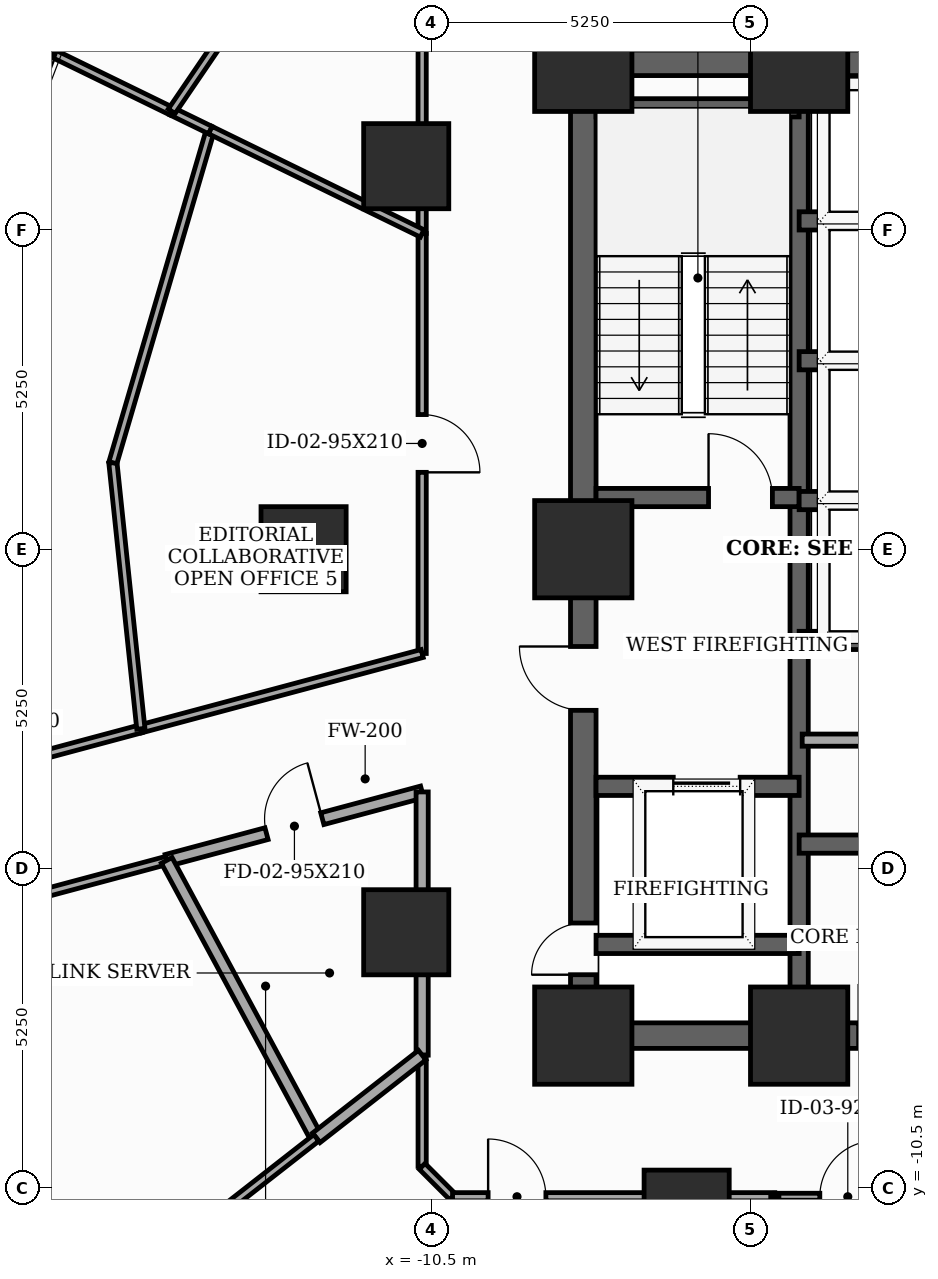
"""IFC4 building model, lengths in metres.
Left out: names, types, materials, properties, quantities, classifications, styles, units other than length and angle.
Written with IfcOpenShell. Run it as: python <this file> out.ifc"""

import sys

from ifc_helpers import new_model, si_unit, direction, frame, frame_2d, origin, origin_2d, place, context, subcontext, project, spatial, rectangle, extrude, element, fill, save


model = new_model("IFC4")
c1 = context("Model", 3, precision=1e-05, world=origin(), true_north=direction((0.0, 1.0)))
c2 = subcontext(c1, "Body", "Model", "MODEL_VIEW")
j1 = project(units=[si_unit("LENGTHUNIT", "METRE"), si_unit("PLANEANGLEUNIT", "RADIAN")], contexts=[c1])
p1 = place(None, origin())
s1 = spatial("IfcSite", under=j1, at=p1, CompositionType="ELEMENT")
p2 = place(p1, origin())
s2 = spatial("IfcBuilding", under=s1, at=p2, CompositionType="ELEMENT")
p3 = place(p2, frame((0.0, 0.0, 77.8)))
s3 = spatial("IfcBuildingStorey", under=s2, at=p3, CompositionType="ELEMENT", Elevation=77.8)
for number, where, z_axis, x_axis in (
    (1, (-8.0, -8.0, 0.0), (0.0, 0.0, 1.0), (1.0, 0.0, 0.0)),
    (2, (-4.45, -8.0, 0.0), (0.0, 0.0, 1.0), (1.0, 0.0, 0.0)),
    (3, (-4.45, 8.0, 0.0), (0.0, 0.0, 1.0), (1.0, 0.0, 0.0)),
    (4, (-8.0, 8.0, 0.0), (0.0, 0.0, 1.0), (1.0, 0.0, 0.0)),
    (5, (-8.0, 0.0, 0.0), (0.0, 0.0, 1.0), (1.0, 0.0, 0.0)),
):
    element("IfcColumn", number, at=place(p3, frame(where, z_axis=z_axis, x_axis=x_axis)), inside=s3, PredefinedType="COLUMN", context=c2, shape_type="SweptSolid", body=[
        extrude(rectangle(XDim=1.6, YDim=1.6, at=origin_2d()), origin(), (0.0, 0.0, 1.0), 3.7),
    ])
for number, where, z_axis, x_axis in (
    (6, (-10.912, 6.3, 0.0), (0.0, 0.0, 1.0), (1.0, 0.0, 0.0)),
    (7, (-12.6, 0.0, 0.0), (0.0, 0.0, 1.0), (1.0, 0.0, 0.0)),
    (8, (-10.912, -6.3, 0.0), (0.0, 0.0, 1.0), (1.0, 0.0, 0.0)),
    (9, (-6.3, -10.912, 0.0), (0.0, 0.0, 1.0), (1.0, 0.0, 0.0)),
):
    element("IfcColumn", number, at=place(p3, frame(where, z_axis=z_axis, x_axis=x_axis)), inside=s3, PredefinedType="COLUMN", context=c2, shape_type="SweptSolid", body=[
        extrude(rectangle(XDim=1.4, YDim=1.4, at=origin_2d()), origin(), (0.0, 0.0, 1.0), 3.7),
    ])
p4 = place(p3, frame((-8.0, -8.0, 0.0), z_axis=(0.0, 0.0, 1.0), x_axis=(0.0, 1.0, 0.0)))
e10 = element("IfcWall", 10, at=p4, inside=s3, PredefinedType="SHEAR", context=c2, shape_type="SweptSolid", body=[
    extrude(rectangle(XDim=16.0, YDim=0.42, at=frame_2d((8.0, 0.0))), origin(), (0.0, 0.0, 1.0), 3.5),
])
p5 = place(p4, frame((1.002, 0.0, 0.0)))
e11 = element("IfcOpeningElement", 11, at=p5, cuts=e10, PredefinedType="OPENING", context=c2, shape_type="SweptSolid", body=[
    extrude(rectangle(XDim=0.85, YDim=2.02, at=frame_2d((0.425, 1.01))), frame((0.0, 0.22, 0.0), z_axis=(0.0, -1.0, 0.0), x_axis=(1.0, 0.0, 0.0)), (0.0, 0.0, 1.0), 0.44),
])
p6 = place(p4, frame((5.35, 0.0, 0.0)))
e12 = element("IfcOpeningElement", 12, at=p6, cuts=e10, PredefinedType="OPENING", context=c2, shape_type="SweptSolid", body=[
    extrude(rectangle(XDim=1.05, YDim=2.15, at=frame_2d((0.525, 1.075))), frame((0.0, 0.22, 0.0), z_axis=(0.0, -1.0, 0.0), x_axis=(1.0, 0.0, 0.0)), (0.0, 0.0, 1.0), 0.44),
])
p7 = place(p3, frame((-8.0, -8.0, 0.0), z_axis=(0.0, 0.0, 1.0), x_axis=(1.0, 0.0, 0.0)))
e13 = element("IfcWall", 13, at=p7, inside=s3, PredefinedType="SHEAR", context=c2, shape_type="SweptSolid", body=[
    extrude(rectangle(XDim=16.0, YDim=0.42, at=frame_2d((8.0, 0.0))), origin(), (0.0, 0.0, 1.0), 3.5),
])
p8 = place(p7, frame((4.529, 0.0, 0.0)))
e14 = element("IfcOpeningElement", 14, at=p8, cuts=e13, PredefinedType="OPENING", context=c2, shape_type="SweptSolid", body=[
    extrude(rectangle(XDim=0.85, YDim=2.02, at=frame_2d((0.425, 1.01))), frame((0.0, 0.22, 0.0), z_axis=(0.0, -1.0, 0.0), x_axis=(1.0, 0.0, 0.0)), (0.0, 0.0, 1.0), 0.44),
])
p9 = place(p7, frame((6.49, 0.0, 0.0)))
e15 = element("IfcOpeningElement", 15, at=p9, cuts=e13, PredefinedType="OPENING", context=c2, shape_type="SweptSolid", body=[
    extrude(rectangle(XDim=0.85, YDim=2.02, at=frame_2d((0.425, 1.01))), frame((0.0, 0.22, 0.0), z_axis=(0.0, -1.0, 0.0), x_axis=(1.0, 0.0, 0.0)), (0.0, 0.0, 1.0), 0.44),
])
p10 = place(p7, frame((8.69, 0.0, 0.0)))
e16 = element("IfcOpeningElement", 16, at=p10, cuts=e13, PredefinedType="OPENING", context=c2, shape_type="SweptSolid", body=[
    extrude(rectangle(XDim=0.85, YDim=2.02, at=frame_2d((0.425, 1.01))), frame((0.0, 0.22, 0.0), z_axis=(0.0, -1.0, 0.0), x_axis=(1.0, 0.0, 0.0)), (0.0, 0.0, 1.0), 0.44),
])
p11 = place(p7, frame((10.621, 0.0, 0.0)))
e17 = element("IfcOpeningElement", 17, at=p11, cuts=e13, PredefinedType="OPENING", context=c2, shape_type="SweptSolid", body=[
    extrude(rectangle(XDim=0.85, YDim=2.02, at=frame_2d((0.425, 1.01))), frame((0.0, 0.22, 0.0), z_axis=(0.0, -1.0, 0.0), x_axis=(1.0, 0.0, 0.0)), (0.0, 0.0, 1.0), 0.44),
])
p12 = place(p3, frame((-8.0, 8.0, 0.0), z_axis=(0.0, 0.0, 1.0), x_axis=(1.0, 0.0, 0.0)))
e18 = element("IfcWall", 18, at=p12, inside=s3, PredefinedType="SHEAR", context=c2, shape_type="SweptSolid", body=[
    extrude(rectangle(XDim=16.0, YDim=0.42, at=frame_2d((8.0, 0.0))), origin(), (0.0, 0.0, 1.0), 3.5),
])
p13 = place(p12, frame((7.1, 0.0, 0.0)))
e19 = element("IfcOpeningElement", 19, at=p13, cuts=e18, PredefinedType="OPENING", context=c2, shape_type="SweptSolid", body=[
    extrude(rectangle(XDim=1.8, YDim=2.15, at=frame_2d((0.9, 1.075))), frame((0.0, 0.22, 0.0), z_axis=(0.0, -1.0, 0.0), x_axis=(1.0, 0.0, 0.0)), (0.0, 0.0, 1.0), 0.44),
])
p14 = place(p3, frame((-4.45, -7.79, 0.0), z_axis=(0.0, 0.0, 1.0), x_axis=(0.0, 1.0, 0.0)))
e20 = element("IfcWall", 20, at=p14, inside=s3, PredefinedType="SHEAR", context=c2, shape_type="SweptSolid", body=[
    extrude(rectangle(XDim=15.58, YDim=0.3, at=frame_2d((7.79, 0.0))), origin(), (0.0, 0.0, 1.0), 3.5),
])
p15 = place(p3, frame((-7.79, 0.85, 0.0), z_axis=(0.0, 0.0, 1.0), x_axis=(1.0, 0.0, 0.0)))
e21 = element("IfcWall", 21, at=p15, inside=s3, PredefinedType="SHEAR", context=c2, shape_type="SweptSolid", body=[
    extrude(rectangle(XDim=3.34, YDim=0.3, at=frame_2d((1.67, 0.0))), origin(), (0.0, 0.0, 1.0), 3.5),
])
p16 = place(p15, frame((1.85, 0.0, 0.0)))
e22 = element("IfcOpeningElement", 22, at=p16, cuts=e21, PredefinedType="OPENING", context=c2, shape_type="SweptSolid", body=[
    extrude(rectangle(XDim=1.05, YDim=2.15, at=frame_2d((0.525, 1.075))), frame((0.0, 0.16, 0.0), z_axis=(0.0, -1.0, 0.0), x_axis=(1.0, 0.0, 0.0)), (0.0, 0.0, 1.0), 0.32),
])
p17 = place(p3, frame((-7.79, 7.26, 0.0), z_axis=(0.0, 0.0, 1.0), x_axis=(1.0, 0.0, 0.0)))
e23 = element("IfcWall", 23, at=p17, inside=s3, PredefinedType="SHEAR", context=c2, shape_type="SweptSolid", body=[
    extrude(rectangle(XDim=3.34, YDim=0.3, at=frame_2d((1.67, 0.0))), origin(), (0.0, 0.0, 1.0), 3.5),
])
p18 = place(p3, frame((-7.79, -3.9, 0.0), z_axis=(0.0, 0.0, 1.0), x_axis=(1.0, 0.0, 0.0)))
e24 = element("IfcWall", 24, at=p18, inside=s3, PredefinedType="SHEAR", context=c2, shape_type="SweptSolid", body=[
    extrude(rectangle(XDim=3.34, YDim=0.3, at=frame_2d((1.67, 0.0))), origin(), (0.0, 0.0, 1.0), 3.5),
])
p19 = place(p18, frame((1.27, 0.0, 0.0)))
e25 = element("IfcOpeningElement", 25, at=p19, cuts=e24, PredefinedType="OPENING", context=c2, shape_type="SweptSolid", body=[
    extrude(rectangle(XDim=1.1, YDim=2.1, at=frame_2d((0.55, 1.05))), frame((0.0, 0.16, 0.0), z_axis=(0.0, -1.0, 0.0), x_axis=(1.0, 0.0, 0.0)), (0.0, 0.0, 1.0), 0.32),
])
p20 = place(p3, frame((-7.79, -6.5, 0.0), z_axis=(0.0, 0.0, 1.0), x_axis=(1.0, 0.0, 0.0)))
e26 = element("IfcWall", 26, at=p20, inside=s3, PredefinedType="SHEAR", context=c2, shape_type="SweptSolid", body=[
    extrude(rectangle(XDim=3.34, YDim=0.3, at=frame_2d((1.67, 0.0))), origin(), (0.0, 0.0, 1.0), 3.5),
])
p21 = place(p3, frame((-4.45, -4.85, 0.0), z_axis=(0.0, 0.0, 1.0), x_axis=(1.0, 0.0, 0.0)))
e27 = element("IfcWall", 27, at=p21, inside=s3, PredefinedType="SHEAR", context=c2, shape_type="SweptSolid", body=[
    extrude(rectangle(XDim=8.9, YDim=0.3, at=frame_2d((4.45, 0.0))), origin(), (0.0, 0.0, 1.0), 3.5),
])
for number, where, z_axis, x_axis in (
    (28, (-4.45, -1.5, 0.0), (0.0, 0.0, 1.0), (1.0, 0.0, 0.0)),
    (29, (-4.45, 0.8, 0.0), (0.0, 0.0, 1.0), (1.0, 0.0, 0.0)),
    (30, (-4.45, 3.1, 0.0), (0.0, 0.0, 1.0), (1.0, 0.0, 0.0)),
    (31, (-4.45, 5.4, 0.0), (0.0, 0.0, 1.0), (1.0, 0.0, 0.0)),
):
    element("IfcWall", number, at=place(p3, frame(where, z_axis=z_axis, x_axis=x_axis)), inside=s3, PredefinedType="SHEAR", context=c2, shape_type="SweptSolid", body=[
        extrude(rectangle(XDim=2.77, YDim=0.3, at=frame_2d((1.385, 0.0))), origin(), (0.0, 0.0, 1.0), 3.5),
    ])
p22 = place(p3, frame((-4.4, -3.14, 0.0), z_axis=(0.0, 0.0, 1.0), x_axis=(1.0, 0.0, 0.0)))
e32 = element("IfcWall", 32, at=p22, inside=s3, PredefinedType="SOLIDWALL", context=c2, shape_type="SweptSolid", body=[
    extrude(rectangle(XDim=2.68, YDim=0.2, at=frame_2d((1.34, 0.0))), origin(), (0.0, 0.0, 1.0), 3.5),
])
p23 = place(p3, frame((-14.851, -5.118, 0.0), z_axis=(0.0, 0.0, 1.0), x_axis=(0.965909963178, 0.258878239783, 0.0)))
e33 = element("IfcWall", 33, at=p23, inside=s3, PredefinedType="SOLIDWALL", context=c2, shape_type="SweptSolid", body=[
    extrude(rectangle(XDim=4.349, YDim=0.2, at=frame_2d((2.175, 0.0))), origin(), (0.0, 0.0, 1.0), 2.785),
])
p24 = place(p23, frame((1.7, 0.0, 0.0)))
e34 = element("IfcOpeningElement", 34, at=p24, cuts=e33, PredefinedType="OPENING", context=c2, shape_type="SweptSolid", body=[
    extrude(rectangle(XDim=0.95, YDim=2.1, at=frame_2d((0.475, 1.05))), frame((0.0, 0.11, 0.0), z_axis=(0.0, -1.0, 0.0), x_axis=(1.0, 0.0, 0.0)), (0.0, 0.0, 1.0), 0.22),
])
p25 = place(p3, frame((-10.65, -3.992, 0.0), z_axis=(0.0, 0.0, 1.0), x_axis=(0.0, -1.0, 0.0)))
e35 = element("IfcWall", 35, at=p25, inside=s3, PredefinedType="SOLIDWALL", context=c2, shape_type="SweptSolid", body=[
    extrude(rectangle(XDim=4.329, YDim=0.2, at=frame_2d((2.165, 0.0))), origin(), (0.0, 0.0, 1.0), 2.785),
])
p26 = place(p3, frame((-15.276, -2.954, 0.0), z_axis=(0.0, 0.0, 1.0), x_axis=(-0.965923168362, -0.258828964418, 0.0)))
e36 = element("IfcWall", 36, at=p26, inside=s3, PredefinedType="PARTITIONING", context=c2, shape_type="SweptSolid", body=[
    extrude(rectangle(XDim=5.08, YDim=0.135, at=frame_2d((2.54, 0.0))), origin(), (0.0, 0.0, 1.0), 2.935),
])
p27 = place(p26, frame((2.065, 0.0, 0.0)))
e37 = element("IfcOpeningElement", 37, at=p27, cuts=e36, PredefinedType="OPENING", context=c2, shape_type="SweptSolid", body=[
    extrude(rectangle(XDim=0.95, YDim=2.1, at=frame_2d((0.475, 1.05))), frame((0.0, 0.077, 0.0), z_axis=(0.0, -1.0, 0.0), x_axis=(1.0, 0.0, 0.0)), (0.0, 0.0, 1.0), 0.155),
])
p28 = place(p3, frame((-19.613, -6.394, 0.0), z_axis=(0.0, 0.0, 1.0), x_axis=(0.965917766169, 0.258849124007, 0.0)))
e38 = element("IfcWall", 38, at=p28, inside=s3, PredefinedType="PARTITIONING", context=c2, shape_type="SweptSolid", body=[
    extrude(rectangle(XDim=4.93, YDim=0.135, at=frame_2d((2.465, 0.0))), origin(), (0.0, 0.0, 1.0), 3.085),
])
p29 = place(p3, frame((-10.65, 5.194, 0.0), z_axis=(0.0, 0.0, 1.0), x_axis=(0.0, -1.0, 0.0)))
e39 = element("IfcWall", 39, at=p29, inside=s3, PredefinedType="PARTITIONING", context=c2, shape_type="SweptSolid", body=[
    extrude(rectangle(XDim=6.909, YDim=0.135, at=frame_2d((3.455, 0.0))), origin(), (0.0, 0.0, 1.0), 2.785),
])
p30 = place(p29, frame((2.979, 0.0, 0.0)))
e40 = element("IfcOpeningElement", 40, at=p30, cuts=e39, PredefinedType="OPENING", context=c2, shape_type="SweptSolid", body=[
    extrude(rectangle(XDim=0.95, YDim=2.1, at=frame_2d((0.475, 1.05))), frame((0.0, 0.077, 0.0), z_axis=(0.0, -1.0, 0.0), x_axis=(1.0, 0.0, 0.0)), (0.0, 0.0, 1.0), 0.155),
])
p31 = place(p3, frame((-10.65, -1.715, 0.0), z_axis=(0.0, 0.0, 1.0), x_axis=(-0.965952601708, -0.258719097196, 0.0)))
e41 = element("IfcWall", 41, at=p31, inside=s3, PredefinedType="PARTITIONING", context=c2, shape_type="SweptSolid", body=[
    extrude(rectangle(XDim=4.789, YDim=0.135, at=frame_2d((2.395, 0.0))), origin(), (0.0, 0.0, 1.0), 2.785),
])
p32 = place(p3, frame((-10.65, -8.321, 0.0), z_axis=(0.0, 0.0, 1.0), x_axis=(0.0, -1.0, 0.0)))
e42 = element("IfcWall", 42, at=p32, inside=s3, PredefinedType="PARTITIONING", context=c2, shape_type="SweptSolid", body=[
    extrude(rectangle(XDim=1.829, YDim=0.135, at=frame_2d((0.915, 0.0))), origin(), (0.0, 0.0, 1.0), 3.5),
])
p33 = place(p3, frame((-10.65, -10.15, 0.0), z_axis=(0.0, 0.0, 1.0), x_axis=(0.707106781187, -0.707106781187, 0.0)))
e43 = element("IfcWall", 43, at=p33, inside=s3, PredefinedType="PARTITIONING", context=c2, shape_type="SweptSolid", body=[
    extrude(rectangle(XDim=0.707, YDim=0.135, at=frame_2d((0.354, 0.0))), origin(), (0.0, 0.0, 1.0), 3.5),
])
p34 = place(p3, frame((-10.15, -10.65, 0.0), z_axis=(0.0, 0.0, 1.0), x_axis=(1.0, 0.0, 0.0)))
e44 = element("IfcWall", 44, at=p34, inside=s3, PredefinedType="PARTITIONING", context=c2, shape_type="SweptSolid", body=[
    extrude(rectangle(XDim=5.3, YDim=0.135, at=frame_2d((2.65, 0.0))), origin(), (0.0, 0.0, 1.0), 2.785),
])
p35 = place(p34, frame((0.585, 0.0, 0.0)))
e45 = element("IfcOpeningElement", 45, at=p35, cuts=e44, PredefinedType="OPENING", context=c2, shape_type="SweptSolid", body=[
    extrude(rectangle(XDim=0.95, YDim=2.1, at=frame_2d((0.475, 1.05))), frame((0.0, 0.077, 0.0), z_axis=(0.0, -1.0, 0.0), x_axis=(1.0, 0.0, 0.0)), (0.0, 0.0, 1.0), 0.155),
])
p36 = place(p3, frame((-4.85, -10.65, 0.0), z_axis=(0.0, 0.0, 1.0), x_axis=(1.0, 0.0, 0.0)))
e46 = element("IfcWall", 46, at=p36, inside=s3, PredefinedType="PARTITIONING", context=c2, shape_type="SweptSolid", body=[
    extrude(rectangle(XDim=2.4, YDim=0.115, at=frame_2d((1.2, 0.0))), origin(), (0.0, 0.0, 1.0), 3.5),
])
p37 = place(p36, frame((0.74, 0.0, 0.0)))
e47 = element("IfcOpeningElement", 47, at=p37, cuts=e46, PredefinedType="OPENING", context=c2, shape_type="SweptSolid", body=[
    extrude(rectangle(XDim=0.92, YDim=2.1, at=frame_2d((0.46, 1.05))), frame((0.0, 0.067, 0.0), z_axis=(0.0, -1.0, 0.0), x_axis=(1.0, 0.0, 0.0)), (0.0, 0.0, 1.0), 0.135),
])
p38 = place(p3, frame((-10.65, 10.15, 0.0), z_axis=(0.0, 0.0, 1.0), x_axis=(0.0, -1.0, 0.0)))
e48 = element("IfcWall", 48, at=p38, inside=s3, PredefinedType="PARTITIONING", context=c2, shape_type="SweptSolid", body=[
    extrude(rectangle(XDim=4.956, YDim=0.135, at=frame_2d((2.478, 0.0))), origin(), (0.0, 0.0, 1.0), 2.785),
])
p39 = place(p38, frame((0.516, 0.0, 0.0)))
e49 = element("IfcOpeningElement", 49, at=p39, cuts=e48, PredefinedType="OPENING", context=c2, shape_type="SweptSolid", body=[
    extrude(rectangle(XDim=0.95, YDim=2.1, at=frame_2d((0.475, 1.05))), frame((0.0, 0.077, 0.0), z_axis=(0.0, -1.0, 0.0), x_axis=(1.0, 0.0, 0.0)), (0.0, 0.0, 1.0), 0.155),
])
p40 = place(p3, frame((-14.851, -5.118, 0.0), z_axis=(0.0, 0.0, 1.0), x_axis=(0.474543506137, -0.880232049395, 0.0)))
e50 = element("IfcWall", 50, at=p40, inside=s3, PredefinedType="SOLIDWALL", context=c2, shape_type="SweptSolid", body=[
    extrude(rectangle(XDim=5.184, YDim=0.2, at=frame_2d((2.592, 0.0))), origin(), (0.0, 0.0, 1.0), 2.785),
])
p41 = place(p3, frame((-12.391, -9.681, 0.0), z_axis=(0.0, 0.0, 1.0), x_axis=(0.788124883644, 0.615515367624, 0.0)))
e51 = element("IfcWall", 51, at=p41, inside=s3, PredefinedType="SOLIDWALL", context=c2, shape_type="SweptSolid", body=[
    extrude(rectangle(XDim=2.209, YDim=0.2, at=frame_2d((1.104, 0.0))), origin(), (0.0, 0.0, 1.0), 3.5),
])
p42 = place(p3, frame((-15.276, -2.954, 0.0), z_axis=(0.0, 0.0, 1.0), x_axis=(-0.104560622475, 0.994518514774, 0.0)))
e52 = element("IfcWall", 52, at=p42, inside=s3, PredefinedType="PARTITIONING", context=c2, shape_type="SweptSolid", body=[
    extrude(rectangle(XDim=4.401, YDim=0.135, at=frame_2d((2.201, 0.0))), origin(), (0.0, 0.0, 1.0), 2.785),
])
p43 = place(p3, frame((-15.736, 1.423, 0.0), z_axis=(0.0, 0.0, 1.0), x_axis=(0.281231672123, 0.959639904649, 0.0)))
e53 = element("IfcWall", 53, at=p43, inside=s3, PredefinedType="PARTITIONING", context=c2, shape_type="SweptSolid", body=[
    extrude(rectangle(XDim=5.7, YDim=0.135, at=frame_2d((2.85, 0.0))), origin(), (0.0, 0.0, 1.0), 3.5),
])
p44 = place(p3, frame((-25.993, -20.307, 0.0), z_axis=(0.0, 0.0, 1.0), x_axis=(0.788017511585, 0.61565282541, 0.0)))
e54 = element("IfcWall", 54, at=p44, inside=s3, PredefinedType="PARTITIONING", context=c2, shape_type="SweptSolid", body=[
    extrude(rectangle(XDim=17.26, YDim=0.135, at=frame_2d((8.63, 0.0))), origin(), (0.0, 0.0, 1.0), 2.935),
])
p45 = place(p3, frame((-14.769, 7.203, 0.0), z_axis=(0.0, 0.0, 1.0), x_axis=(-0.898774971292, 0.438410254191, 0.0)))
e55 = element("IfcWall", 55, at=p45, inside=s3, PredefinedType="PARTITIONING", context=c2, shape_type="SweptSolid", body=[
    extrude(rectangle(XDim=2.157, YDim=0.135, at=frame_2d((1.079, 0.0))), origin(), (0.0, 0.0, 1.0), 2.935),
])
p46 = place(p3, frame((-14.133, 6.893, 0.0), z_axis=(0.0, 0.0, 1.0), x_axis=(-0.899003804691, 0.437940816949, 0.0)))
e56 = element("IfcWall", 56, at=p46, inside=s3, PredefinedType="PARTITIONING", context=c2, shape_type="SweptSolid", body=[
    extrude(rectangle(XDim=0.708, YDim=0.135, at=frame_2d((0.354, 0.0))), origin(), (0.0, 0.0, 1.0), 3.5),
])
p47 = place(p3, frame((-10.65, 5.194, 0.0), z_axis=(0.0, 0.0, 1.0), x_axis=(-0.898781159743, 0.438397567159, 0.0)))
e57 = element("IfcWall", 57, at=p47, inside=s3, PredefinedType="PARTITIONING", context=c2, shape_type="SweptSolid", body=[
    extrude(rectangle(XDim=3.875, YDim=0.135, at=frame_2d((1.938, 0.0))), origin(), (0.0, 0.0, 1.0), 2.785),
])
p48 = place(p3, frame((-4.85, -13.1, 0.0), z_axis=(0.0, 0.0, 1.0), x_axis=(0.0, 1.0, 0.0)))
e58 = element("IfcWall", 58, at=p48, inside=s3, PredefinedType="PARTITIONING", context=c2, shape_type="SweptSolid", body=[
    extrude(rectangle(XDim=2.45, YDim=0.135, at=frame_2d((1.225, 0.0))), origin(), (0.0, 0.0, 1.0), 2.785),
])
p49 = place(p3, frame((-14.769, 7.203, 0.0), z_axis=(0.0, 0.0, 1.0), x_axis=(0.562841259026, 0.826565010836, 0.0)))
e59 = element("IfcWall", 59, at=p49, inside=s3, PredefinedType="PARTITIONING", context=c2, shape_type="SweptSolid", body=[
    extrude(rectangle(XDim=5.153, YDim=0.135, at=frame_2d((2.576, 0.0))), origin(), (0.0, 0.0, 1.0), 2.785),
])
p50 = place(p5, origin())
e60 = element("IfcDoor", 60, at=p50, inside=s3, OperationType="SINGLE_SWING_LEFT", PredefinedType="TRAPDOOR", context=c2, shape_type="SweptSolid", body=[
    extrude(rectangle(XDim=0.85, YDim=2.02, at=frame_2d((0.425, 1.01))), frame((0.0, 0.025, 0.0), z_axis=(0.0, -1.0, 0.0), x_axis=(1.0, 0.0, 0.0)), (0.0, 0.0, 1.0), 0.05),
])
fill(e11, e60)
p51 = place(p6, origin())
e61 = element("IfcDoor", 61, at=p51, inside=s3, OperationType="SINGLE_SWING_RIGHT", PredefinedType="DOOR", context=c2, shape_type="SweptSolid", body=[
    extrude(rectangle(XDim=1.05, YDim=2.15, at=frame_2d((0.525, 1.075))), frame((0.0, 0.025, 0.0), z_axis=(0.0, -1.0, 0.0), x_axis=(1.0, 0.0, 0.0)), (0.0, 0.0, 1.0), 0.05),
])
fill(e12, e61)
p52 = place(p16, origin())
e62 = element("IfcDoor", 62, at=p52, inside=s3, OperationType="SINGLE_SWING_LEFT", PredefinedType="DOOR", context=c2, shape_type="SweptSolid", body=[
    extrude(rectangle(XDim=1.05, YDim=2.15, at=frame_2d((0.525, 1.075))), frame((0.0, 0.025, 0.0), z_axis=(0.0, -1.0, 0.0), x_axis=(1.0, 0.0, 0.0)), (0.0, 0.0, 1.0), 0.05),
])
fill(e22, e62)
p53 = place(p19, origin())
e63 = element("IfcDoor", 63, at=p53, inside=s3, OperationType="SLIDING_TO_LEFT", PredefinedType="DOOR", context=c2, shape_type="SweptSolid", body=[
    extrude(rectangle(XDim=1.1, YDim=2.1, at=frame_2d((0.55, 1.05))), frame((0.0, 0.025, 0.0), z_axis=(0.0, -1.0, 0.0), x_axis=(1.0, 0.0, 0.0)), (0.0, 0.0, 1.0), 0.05),
])
fill(e25, e63)
p54 = place(p24, origin())
e64 = element("IfcDoor", 64, at=p54, inside=s3, OperationType="SINGLE_SWING_RIGHT", PredefinedType="DOOR", context=c2, shape_type="SweptSolid", body=[
    extrude(rectangle(XDim=0.95, YDim=2.1, at=frame_2d((0.475, 1.05))), frame((0.0, 0.025, 0.0), z_axis=(0.0, -1.0, 0.0), x_axis=(1.0, 0.0, 0.0)), (0.0, 0.0, 1.0), 0.05),
])
fill(e34, e64)
p55 = place(p30, origin())
e65 = element("IfcDoor", 65, at=p55, inside=s3, OperationType="SINGLE_SWING_RIGHT", PredefinedType="DOOR", context=c2, shape_type="SweptSolid", body=[
    extrude(rectangle(XDim=0.95, YDim=2.1, at=frame_2d((0.475, 1.05))), frame((0.0, 0.025, 0.0), z_axis=(0.0, -1.0, 0.0), x_axis=(1.0, 0.0, 0.0)), (0.0, 0.0, 1.0), 0.05),
])
fill(e40, e65)
p56 = place(p35, origin())
e66 = element("IfcDoor", 66, at=p56, inside=s3, OperationType="SINGLE_SWING_LEFT", PredefinedType="DOOR", context=c2, shape_type="SweptSolid", body=[
    extrude(rectangle(XDim=0.95, YDim=2.1, at=frame_2d((0.475, 1.05))), frame((0.0, 0.025, 0.0), z_axis=(0.0, -1.0, 0.0), x_axis=(1.0, 0.0, 0.0)), (0.0, 0.0, 1.0), 0.05),
])
fill(e45, e66)
p57 = place(p37, origin())
e67 = element("IfcDoor", 67, at=p57, inside=s3, OperationType="SINGLE_SWING_RIGHT", PredefinedType="DOOR", context=c2, shape_type="SweptSolid", body=[
    extrude(rectangle(XDim=0.92, YDim=2.1, at=frame_2d((0.46, 1.05))), frame((0.0, 0.025, 0.0), z_axis=(0.0, -1.0, 0.0), x_axis=(1.0, 0.0, 0.0)), (0.0, 0.0, 1.0), 0.05),
])
fill(e47, e67)
save(model, sys.argv[1])
